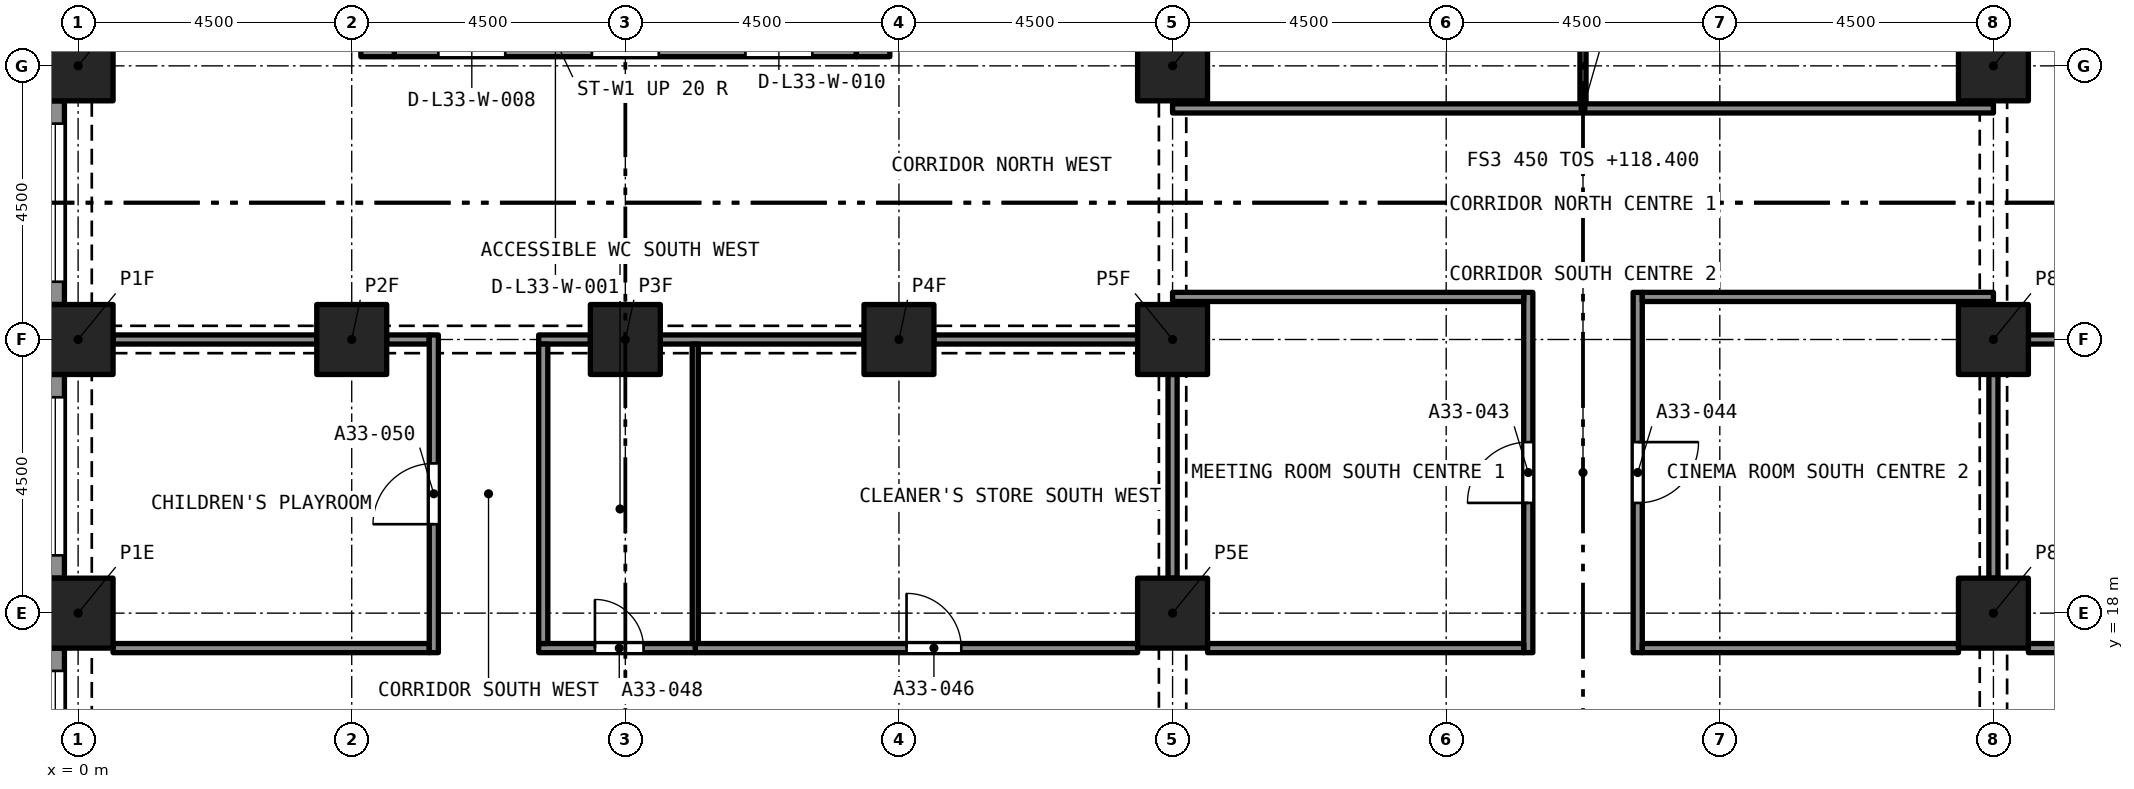
"""IFC4 building model, lengths in metres.
Left out: names, types, materials, properties, quantities, classifications, styles, units other than length and angle.
Written with IfcOpenShell. Run it as: python <this file> out.ifc"""

import sys

from ifc_helpers import new_model, si_unit, direction, frame, frame_2d, origin, origin_2d, place, context, subcontext, project, spatial, rectangle, extrude, element, fill, save


model = new_model("IFC4")
c1 = context("Model", 3, precision=1e-05, world=origin(), true_north=direction((0.0, 1.0)))
c2 = subcontext(c1, "Body", "Model", "MODEL_VIEW")
j1 = project(units=[si_unit("LENGTHUNIT", "METRE"), si_unit("PLANEANGLEUNIT", "RADIAN")], contexts=[c1])
p1 = place(None, origin())
s1 = spatial("IfcSite", under=j1, at=p1, CompositionType="ELEMENT")
p2 = place(p1, origin())
s2 = spatial("IfcBuilding", under=s1, at=p2, CompositionType="ELEMENT")
p3 = place(p2, frame((0.0, 0.0, 118.4)))
s3 = spatial("IfcBuildingStorey", under=s2, at=p3, CompositionType="ELEMENT", Elevation=118.4)
for number, where, z_axis, x_axis in (
    (1, (0.0, 18.0, 0.0), (0.0, 0.0, 1.0), (1.0, 0.0, 0.0)),
    (2, (18.0, 18.0, 0.0), (0.0, 0.0, 1.0), (1.0, 0.0, 0.0)),
    (3, (31.5, 18.0, 0.0), (0.0, 0.0, 1.0), (1.0, 0.0, 0.0)),
    (4, (0.0, 22.5, 0.0), (0.0, 0.0, 1.0), (1.0, 0.0, 0.0)),
    (5, (4.5, 22.5, 0.0), (0.0, 0.0, 1.0), (1.0, 0.0, 0.0)),
    (6, (9.0, 22.5, 0.0), (0.0, 0.0, 1.0), (1.0, 0.0, 0.0)),
    (7, (13.5, 22.5, 0.0), (0.0, 0.0, 1.0), (1.0, 0.0, 0.0)),
    (8, (18.0, 22.5, 0.0), (0.0, 0.0, 1.0), (1.0, 0.0, 0.0)),
    (9, (31.5, 22.5, 0.0), (0.0, 0.0, 1.0), (1.0, 0.0, 0.0)),
    (10, (0.0, 27.0, 0.0), (0.0, 0.0, 1.0), (1.0, 0.0, 0.0)),
    (11, (18.0, 27.0, 0.0), (0.0, 0.0, 1.0), (1.0, 0.0, 0.0)),
    (12, (31.5, 27.0, 0.0), (0.0, 0.0, 1.0), (1.0, 0.0, 0.0)),
):
    element("IfcColumn", number, at=place(p3, frame(where, z_axis=z_axis, x_axis=x_axis)), inside=s3, PredefinedType="COLUMN", context=c2, shape_type="SweptSolid", body=[
        extrude(rectangle(XDim=1.15, YDim=1.15, at=origin_2d()), origin(), (0.0, 0.0, 1.0), 3.2),
    ])
p4 = place(p3, frame((5.2, 27.425, 0.0), z_axis=(0.0, 0.0, 1.0), x_axis=(1.0, 0.0, 0.0)))
e13 = element("IfcWall", 13, at=p4, inside=s3, PredefinedType="SOLIDWALL", context=c2, shape_type="SweptSolid", body=[
    extrude(rectangle(XDim=7.6, YDim=0.55, at=frame_2d((3.8, 0.0))), origin(), (0.0, 0.0, 1.0), 3.2),
])
p5 = place(p4, frame((0.725, 0.0, 0.0)))
e14 = element("IfcOpeningElement", 14, at=p5, cuts=e13, PredefinedType="OPENING", context=c2, shape_type="SweptSolid", body=[
    extrude(rectangle(XDim=1.1, YDim=2.1, at=frame_2d((0.55, 1.05))), frame((0.0, 0.285, 0.0), z_axis=(0.0, -1.0, 0.0), x_axis=(1.0, 0.0, 0.0)), (0.0, 0.0, 1.0), 0.57),
])
p6 = place(p4, frame((3.25, 0.0, 0.0)))
e15 = element("IfcOpeningElement", 15, at=p6, cuts=e13, PredefinedType="OPENING", context=c2, shape_type="SweptSolid", body=[
    extrude(rectangle(XDim=1.1, YDim=2.1, at=frame_2d((0.55, 1.05))), frame((0.0, 0.285, 0.0), z_axis=(0.0, -1.0, 0.0), x_axis=(1.0, 0.0, 0.0)), (0.0, 0.0, 1.0), 0.57),
])
p7 = place(p4, frame((5.775, 0.0, 0.0)))
e16 = element("IfcOpeningElement", 16, at=p7, cuts=e13, PredefinedType="OPENING", context=c2, shape_type="SweptSolid", body=[
    extrude(rectangle(XDim=1.1, YDim=2.1, at=frame_2d((0.55, 1.05))), frame((0.0, 0.285, 0.0), z_axis=(0.0, -1.0, 0.0), x_axis=(1.0, 0.0, 0.0)), (0.0, 0.0, 1.0), 0.57),
])
p8 = place(p3, frame((4.925, 27.15, 0.0), z_axis=(0.0, 0.0, 1.0), x_axis=(0.0, 1.0, 0.0)))
e17 = element("IfcWall", 17, at=p8, inside=s3, PredefinedType="SOLIDWALL", context=c2, shape_type="SweptSolid", body=[
    extrude(rectangle(XDim=13.2, YDim=0.55, at=frame_2d((6.6, 0.0))), origin(), (0.0, 0.0, 1.0), 3.2),
])
p9 = place(p8, frame((8.8, 0.0, 0.0)))
e18 = element("IfcOpeningElement", 18, at=p9, cuts=e17, PredefinedType="OPENING", context=c2, shape_type="SweptSolid", body=[
    extrude(rectangle(XDim=1.2, YDim=2.1, at=frame_2d((0.6, 1.05))), frame((0.0, 0.285, 0.0), z_axis=(0.0, -1.0, 0.0), x_axis=(1.0, 0.0, 0.0)), (0.0, 0.0, 1.0), 0.57),
])
p10 = place(p3, frame((13.075, 27.15, 0.0), z_axis=(0.0, 0.0, 1.0), x_axis=(0.0, 1.0, 0.0)))
e19 = element("IfcWall", 19, at=p10, inside=s3, PredefinedType="SOLIDWALL", context=c2, shape_type="SweptSolid", body=[
    extrude(rectangle(XDim=13.2, YDim=0.55, at=frame_2d((6.6, 0.0))), origin(), (0.0, 0.0, 1.0), 3.2),
])
p11 = place(p10, frame((10.95, 0.0, 0.0)))
e20 = element("IfcOpeningElement", 20, at=p11, cuts=e19, PredefinedType="OPENING", context=c2, shape_type="SweptSolid", body=[
    extrude(rectangle(XDim=1.1, YDim=2.1, at=frame_2d((0.55, 1.05))), frame((0.0, 0.285, 0.0), z_axis=(0.0, -1.0, 0.0), x_axis=(1.0, 0.0, 0.0)), (0.0, 0.0, 1.0), 0.57),
])
p12 = place(p10, frame((8.8, 0.0, 0.0)))
e21 = element("IfcOpeningElement", 21, at=p12, cuts=e19, PredefinedType="OPENING", context=c2, shape_type="SweptSolid", body=[
    extrude(rectangle(XDim=1.2, YDim=2.1, at=frame_2d((0.6, 1.05))), frame((0.0, 0.285, 0.0), z_axis=(0.0, -1.0, 0.0), x_axis=(1.0, 0.0, 0.0)), (0.0, 0.0, 1.0), 0.57),
])
p13 = place(p3, frame((-0.375, 23.075, 0.0), z_axis=(0.0, 0.0, 1.0), x_axis=(0.0, 1.0, 0.0)))
e22 = element("IfcWall", 22, at=p13, inside=s3, PredefinedType="SOLIDWALL", context=c2, shape_type="SweptSolid", body=[
    extrude(rectangle(XDim=3.35, YDim=0.3, at=frame_2d((1.675, 0.0))), origin(), (0.0, 0.0, 1.0), 3.2),
])
p14 = place(p13, frame((0.375, 0.0, 0.45)))
e23 = element("IfcOpeningElement", 23, at=p14, cuts=e22, PredefinedType="OPENING", context=c2, shape_type="SweptSolid", body=[
    extrude(rectangle(XDim=2.6, YDim=1.95, at=frame_2d((1.3, 0.975))), frame((0.0, 0.16, 0.0), z_axis=(0.0, -1.0, 0.0), x_axis=(1.0, 0.0, 0.0)), (0.0, 0.0, 1.0), 0.32),
])
p15 = place(p3, frame((-0.375, 18.575, 0.0), z_axis=(0.0, 0.0, 1.0), x_axis=(0.0, 1.0, 0.0)))
e24 = element("IfcWall", 24, at=p15, inside=s3, PredefinedType="SOLIDWALL", context=c2, shape_type="SweptSolid", body=[
    extrude(rectangle(XDim=3.35, YDim=0.3, at=frame_2d((1.675, 0.0))), origin(), (0.0, 0.0, 1.0), 3.2),
])
p16 = place(p15, frame((0.375, 0.0, 0.45)))
e25 = element("IfcOpeningElement", 25, at=p16, cuts=e24, PredefinedType="OPENING", context=c2, shape_type="SweptSolid", body=[
    extrude(rectangle(XDim=2.6, YDim=1.95, at=frame_2d((1.3, 0.975))), frame((0.0, 0.16, 0.0), z_axis=(0.0, -1.0, 0.0), x_axis=(1.0, 0.0, 0.0)), (0.0, 0.0, 1.0), 0.32),
])
p17 = place(p3, frame((-0.375, 14.075, 0.0), z_axis=(0.0, 0.0, 1.0), x_axis=(0.0, 1.0, 0.0)))
e26 = element("IfcWall", 26, at=p17, inside=s3, PredefinedType="SOLIDWALL", context=c2, shape_type="SweptSolid", body=[
    extrude(rectangle(XDim=3.35, YDim=0.3, at=frame_2d((1.675, 0.0))), origin(), (0.0, 0.0, 1.0), 3.2),
])
p18 = place(p17, frame((0.375, 0.0, 0.45)))
e27 = element("IfcOpeningElement", 27, at=p18, cuts=e26, PredefinedType="OPENING", context=c2, shape_type="SweptSolid", body=[
    extrude(rectangle(XDim=2.6, YDim=1.95, at=frame_2d((1.3, 0.975))), frame((0.0, 0.16, 0.0), z_axis=(0.0, -1.0, 0.0), x_axis=(1.0, 0.0, 0.0)), (0.0, 0.0, 1.0), 0.32),
])
p19 = place(p3, frame((23.85, 17.35, 0.0), z_axis=(0.0, 0.0, 1.0), x_axis=(0.0, 1.0, 0.0)))
e28 = element("IfcWall", 28, at=p19, inside=s3, PredefinedType="PARTITIONING", context=c2, shape_type="SweptSolid", body=[
    extrude(rectangle(XDim=5.925, YDim=0.15, at=frame_2d((2.962, 0.0))), origin(), (0.0, 0.0, 1.0), 2.75),
])
p20 = place(p19, frame((2.462, 0.0, 0.0)))
e29 = element("IfcOpeningElement", 29, at=p20, cuts=e28, PredefinedType="OPENING", context=c2, shape_type="SweptSolid", body=[
    extrude(rectangle(XDim=1.0, YDim=2.1, at=frame_2d((0.5, 1.05))), frame((0.0, 0.085, 0.0), z_axis=(0.0, -1.0, 0.0), x_axis=(1.0, 0.0, 0.0)), (0.0, 0.0, 1.0), 0.17),
])
p21 = place(p3, frame((25.65, 23.275, 0.0), z_axis=(0.0, 0.0, 1.0), x_axis=(0.0, -1.0, 0.0)))
e30 = element("IfcWall", 30, at=p21, inside=s3, PredefinedType="PARTITIONING", context=c2, shape_type="SweptSolid", body=[
    extrude(rectangle(XDim=5.925, YDim=0.15, at=frame_2d((2.962, 0.0))), origin(), (0.0, 0.0, 1.0), 2.75),
])
p22 = place(p21, frame((2.462, 0.0, 0.0)))
e31 = element("IfcOpeningElement", 31, at=p22, cuts=e30, PredefinedType="OPENING", context=c2, shape_type="SweptSolid", body=[
    extrude(rectangle(XDim=1.0, YDim=2.1, at=frame_2d((0.5, 1.05))), frame((0.0, 0.085, 0.0), z_axis=(0.0, -1.0, 0.0), x_axis=(1.0, 0.0, 0.0)), (0.0, 0.0, 1.0), 0.17),
])
for number, where, z_axis, x_axis in (
    (32, (18.575, 17.425, 0.0), (0.0, 0.0, 1.0), (1.0, 0.0, 0.0)),
    (33, (25.725, 17.425, 0.0), (0.0, 0.0, 1.0), (1.0, 0.0, 0.0)),
):
    element("IfcWall", number, at=place(p3, frame(where, z_axis=z_axis, x_axis=x_axis)), inside=s3, PredefinedType="PARTITIONING", context=c2, shape_type="SweptSolid", body=[
        extrude(rectangle(XDim=5.2, YDim=0.15, at=frame_2d((2.6, 0.0))), origin(), (0.0, 0.0, 1.0), 2.75),
    ])
p23 = place(p3, frame((32.075, 17.425, 0.0), z_axis=(0.0, 0.0, 1.0), x_axis=(1.0, 0.0, 0.0)))
e34 = element("IfcWall", 34, at=p23, inside=s3, PredefinedType="PARTITIONING", context=c2, shape_type="SweptSolid", body=[
    extrude(rectangle(XDim=7.275, YDim=0.15, at=frame_2d((3.638, 0.0))), origin(), (0.0, 0.0, 1.0), 2.9),
])
p24 = place(p23, frame((2.9, 0.0, 0.0)))
e35 = element("IfcOpeningElement", 35, at=p24, cuts=e34, PredefinedType="OPENING", context=c2, shape_type="SweptSolid", body=[
    extrude(rectangle(XDim=0.9, YDim=2.1, at=frame_2d((0.45, 1.05))), frame((0.0, 0.085, 0.0), z_axis=(0.0, -1.0, 0.0), x_axis=(1.0, 0.0, 0.0)), (0.0, 0.0, 1.0), 0.17),
])
p25 = place(p3, frame((10.15, 17.425, 0.0), z_axis=(0.0, 0.0, 1.0), x_axis=(1.0, 0.0, 0.0)))
e36 = element("IfcWall", 36, at=p25, inside=s3, PredefinedType="PARTITIONING", context=c2, shape_type="SweptSolid", body=[
    extrude(rectangle(XDim=7.275, YDim=0.15, at=frame_2d((3.638, 0.0))), origin(), (0.0, 0.0, 1.0), 2.9),
])
p26 = place(p25, frame((3.475, 0.0, 0.0)))
e37 = element("IfcOpeningElement", 37, at=p26, cuts=e36, PredefinedType="OPENING", context=c2, shape_type="SweptSolid", body=[
    extrude(rectangle(XDim=0.9, YDim=2.1, at=frame_2d((0.45, 1.05))), frame((0.0, 0.085, 0.0), z_axis=(0.0, -1.0, 0.0), x_axis=(1.0, 0.0, 0.0)), (0.0, 0.0, 1.0), 0.17),
])
p27 = place(p3, frame((7.575, 17.425, 0.0), z_axis=(0.0, 0.0, 1.0), x_axis=(1.0, 0.0, 0.0)))
e38 = element("IfcWall", 38, at=p27, inside=s3, PredefinedType="PARTITIONING", context=c2, shape_type="SweptSolid", body=[
    extrude(rectangle(XDim=2.575, YDim=0.15, at=frame_2d((1.288, 0.0))), origin(), (0.0, 0.0, 1.0), 2.9),
])
p28 = place(p27, frame((0.925, 0.0, 0.0)))
e39 = element("IfcOpeningElement", 39, at=p28, cuts=e38, PredefinedType="OPENING", context=c2, shape_type="SweptSolid", body=[
    extrude(rectangle(XDim=0.8, YDim=2.1, at=frame_2d((0.4, 1.05))), frame((0.0, 0.085, 0.0), z_axis=(0.0, -1.0, 0.0), x_axis=(1.0, 0.0, 0.0)), (0.0, 0.0, 1.0), 0.17),
])
p29 = place(p3, frame((0.575, 17.425, 0.0), z_axis=(0.0, 0.0, 1.0), x_axis=(1.0, 0.0, 0.0)))
e40 = element("IfcWall", 40, at=p29, inside=s3, PredefinedType="PARTITIONING", context=c2, shape_type="SweptSolid", body=[
    extrude(rectangle(XDim=5.2, YDim=0.15, at=frame_2d((2.6, 0.0))), origin(), (0.0, 0.0, 1.0), 2.9),
])
p30 = place(p3, frame((24.75, 26.375, 0.0), z_axis=(0.0, 0.0, 1.0), x_axis=(0.0, 1.0, 0.0)))
e41 = element("IfcWall", 41, at=p30, inside=s3, PredefinedType="PARTITIONING", context=c2, shape_type="SweptSolid", body=[
    extrude(rectangle(XDim=10.125, YDim=0.1, at=frame_2d((5.062, 0.0))), origin(), (0.0, 0.0, 1.0), 2.75),
])
p31 = place(p3, frame((18.0, 26.3, 0.0), z_axis=(0.0, 0.0, 1.0), x_axis=(1.0, 0.0, 0.0)))
e42 = element("IfcWall", 42, at=p31, inside=s3, PredefinedType="PARTITIONING", context=c2, shape_type="SweptSolid", body=[
    extrude(rectangle(XDim=13.5, YDim=0.15, at=frame_2d((6.75, 0.0))), origin(), (0.0, 0.0, 1.0), 2.38),
])
p32 = place(p3, frame((18.0, 23.2, 0.0), z_axis=(0.0, 0.0, 1.0), x_axis=(1.0, 0.0, 0.0)))
e43 = element("IfcWall", 43, at=p32, inside=s3, PredefinedType="PARTITIONING", context=c2, shape_type="SweptSolid", body=[
    extrude(rectangle(XDim=5.775, YDim=0.15, at=frame_2d((2.887, 0.0))), origin(), (0.0, 0.0, 1.0), 2.75),
])
p33 = place(p3, frame((18.0, 18.575, 0.0), z_axis=(0.0, 0.0, 1.0), x_axis=(0.0, 1.0, 0.0)))
e44 = element("IfcWall", 44, at=p33, inside=s3, PredefinedType="PARTITIONING", context=c2, shape_type="SweptSolid", body=[
    extrude(rectangle(XDim=3.35, YDim=0.15, at=frame_2d((1.675, 0.0))), origin(), (0.0, 0.0, 1.0), 2.38),
])
p34 = place(p3, frame((25.725, 23.2, 0.0), z_axis=(0.0, 0.0, 1.0), x_axis=(1.0, 0.0, 0.0)))
e45 = element("IfcWall", 45, at=p34, inside=s3, PredefinedType="PARTITIONING", context=c2, shape_type="SweptSolid", body=[
    extrude(rectangle(XDim=5.775, YDim=0.15, at=frame_2d((2.887, 0.0))), origin(), (0.0, 0.0, 1.0), 2.75),
])
p35 = place(p3, frame((31.5, 18.575, 0.0), z_axis=(0.0, 0.0, 1.0), x_axis=(0.0, 1.0, 0.0)))
e46 = element("IfcWall", 46, at=p35, inside=s3, PredefinedType="PARTITIONING", context=c2, shape_type="SweptSolid", body=[
    extrude(rectangle(XDim=3.35, YDim=0.15, at=frame_2d((1.675, 0.0))), origin(), (0.0, 0.0, 1.0), 2.38),
])
p36 = place(p3, frame((32.075, 22.5, 0.0), z_axis=(0.0, 0.0, 1.0), x_axis=(1.0, 0.0, 0.0)))
e47 = element("IfcWall", 47, at=p36, inside=s3, PredefinedType="PARTITIONING", context=c2, shape_type="SweptSolid", body=[
    extrude(rectangle(XDim=9.85, YDim=0.15, at=frame_2d((4.925, 0.0))), origin(), (0.0, 0.0, 1.0), 2.9),
])
for number, where, z_axis, x_axis in (
    (48, (14.075, 22.5, 0.0), (0.0, 0.0, 1.0), (1.0, 0.0, 0.0)),
    (49, (9.575, 22.5, 0.0), (0.0, 0.0, 1.0), (1.0, 0.0, 0.0)),
):
    element("IfcWall", number, at=place(p3, frame(where, z_axis=z_axis, x_axis=x_axis)), inside=s3, PredefinedType="PARTITIONING", context=c2, shape_type="SweptSolid", body=[
        extrude(rectangle(XDim=3.35, YDim=0.15, at=frame_2d((1.675, 0.0))), origin(), (0.0, 0.0, 1.0), 2.38),
    ])
p37 = place(p3, frame((7.575, 22.5, 0.0), z_axis=(0.0, 0.0, 1.0), x_axis=(1.0, 0.0, 0.0)))
e50 = element("IfcWall", 50, at=p37, inside=s3, PredefinedType="PARTITIONING", context=c2, shape_type="SweptSolid", body=[
    extrude(rectangle(XDim=0.85, YDim=0.15, at=frame_2d((0.425, 0.0))), origin(), (0.0, 0.0, 1.0), 2.38),
])
p38 = place(p3, frame((5.075, 22.5, 0.0), z_axis=(0.0, 0.0, 1.0), x_axis=(1.0, 0.0, 0.0)))
e51 = element("IfcWall", 51, at=p38, inside=s3, PredefinedType="PARTITIONING", context=c2, shape_type="SweptSolid", body=[
    extrude(rectangle(XDim=0.7, YDim=0.15, at=frame_2d((0.35, 0.0))), origin(), (0.0, 0.0, 1.0), 2.38),
])
p39 = place(p3, frame((0.575, 22.5, 0.0), z_axis=(0.0, 0.0, 1.0), x_axis=(1.0, 0.0, 0.0)))
e52 = element("IfcWall", 52, at=p39, inside=s3, PredefinedType="PARTITIONING", context=c2, shape_type="SweptSolid", body=[
    extrude(rectangle(XDim=3.35, YDim=0.15, at=frame_2d((1.675, 0.0))), origin(), (0.0, 0.0, 1.0), 2.38),
])
p40 = place(p3, frame((7.65, 17.5, 0.0), z_axis=(0.0, 0.0, 1.0), x_axis=(0.0, 1.0, 0.0)))
e53 = element("IfcWall", 53, at=p40, inside=s3, PredefinedType="PARTITIONING", context=c2, shape_type="SweptSolid", body=[
    extrude(rectangle(XDim=4.925, YDim=0.15, at=frame_2d((2.462, 0.0))), origin(), (0.0, 0.0, 1.0), 2.9),
])
p41 = place(p3, frame((5.85, 17.35, 0.0), z_axis=(0.0, 0.0, 1.0), x_axis=(0.0, 1.0, 0.0)))
e54 = element("IfcWall", 54, at=p41, inside=s3, PredefinedType="PARTITIONING", context=c2, shape_type="SweptSolid", body=[
    extrude(rectangle(XDim=5.225, YDim=0.15, at=frame_2d((2.612, 0.0))), origin(), (0.0, 0.0, 1.0), 2.9),
])
p42 = place(p41, frame((2.113, 0.0, 0.0)))
e55 = element("IfcOpeningElement", 55, at=p42, cuts=e54, PredefinedType="OPENING", context=c2, shape_type="SweptSolid", body=[
    extrude(rectangle(XDim=1.0, YDim=2.1, at=frame_2d((0.5, 1.05))), frame((0.0, 0.085, 0.0), z_axis=(0.0, -1.0, 0.0), x_axis=(1.0, 0.0, 0.0)), (0.0, 0.0, 1.0), 0.17),
])
p43 = place(p3, frame((10.15, 17.5, 0.0), z_axis=(0.0, 0.0, 1.0), x_axis=(0.0, 1.0, 0.0)))
e56 = element("IfcWall", 56, at=p43, inside=s3, PredefinedType="PARTITIONING", context=c2, shape_type="SweptSolid", body=[
    extrude(rectangle(XDim=4.925, YDim=0.1, at=frame_2d((2.462, 0.0))), origin(), (0.0, 0.0, 1.0), 2.9),
])
p44 = place(p14, origin())
e57 = element("IfcWindow", 57, at=p44, inside=s3, PartitioningType="SINGLE_PANEL", PredefinedType="WINDOW", context=c2, shape_type="SweptSolid", body=[
    extrude(rectangle(XDim=2.6, YDim=1.95, at=frame_2d((1.3, 0.975))), frame((0.0, 0.03, 0.0), z_axis=(0.0, -1.0, 0.0), x_axis=(1.0, 0.0, 0.0)), (0.0, 0.0, 1.0), 0.06),
])
fill(e23, e57)
p45 = place(p16, origin())
e58 = element("IfcWindow", 58, at=p45, inside=s3, PartitioningType="SINGLE_PANEL", PredefinedType="WINDOW", context=c2, shape_type="SweptSolid", body=[
    extrude(rectangle(XDim=2.6, YDim=1.95, at=frame_2d((1.3, 0.975))), frame((0.0, 0.03, 0.0), z_axis=(0.0, -1.0, 0.0), x_axis=(1.0, 0.0, 0.0)), (0.0, 0.0, 1.0), 0.06),
])
fill(e25, e58)
p46 = place(p18, origin())
e59 = element("IfcWindow", 59, at=p46, inside=s3, PartitioningType="SINGLE_PANEL", PredefinedType="WINDOW", context=c2, shape_type="SweptSolid", body=[
    extrude(rectangle(XDim=2.6, YDim=1.95, at=frame_2d((1.3, 0.975))), frame((0.0, 0.03, 0.0), z_axis=(0.0, -1.0, 0.0), x_axis=(1.0, 0.0, 0.0)), (0.0, 0.0, 1.0), 0.06),
])
fill(e27, e59)
p47 = place(p20, origin())
e60 = element("IfcDoor", 60, at=p47, inside=s3, OperationType="SINGLE_SWING_RIGHT", PredefinedType="DOOR", context=c2, shape_type="SweptSolid", body=[
    extrude(rectangle(XDim=1.0, YDim=2.1, at=frame_2d((0.5, 1.05))), frame((0.0, 0.025, 0.0), z_axis=(0.0, -1.0, 0.0), x_axis=(1.0, 0.0, 0.0)), (0.0, 0.0, 1.0), 0.05),
])
fill(e29, e60)
p48 = place(p22, origin())
e61 = element("IfcDoor", 61, at=p48, inside=s3, OperationType="SINGLE_SWING_RIGHT", PredefinedType="DOOR", context=c2, shape_type="SweptSolid", body=[
    extrude(rectangle(XDim=1.0, YDim=2.1, at=frame_2d((0.5, 1.05))), frame((0.0, 0.025, 0.0), z_axis=(0.0, -1.0, 0.0), x_axis=(1.0, 0.0, 0.0)), (0.0, 0.0, 1.0), 0.05),
])
fill(e31, e61)
p49 = place(p26, origin())
e62 = element("IfcDoor", 62, at=p49, inside=s3, OperationType="SINGLE_SWING_RIGHT", PredefinedType="DOOR", context=c2, shape_type="SweptSolid", body=[
    extrude(rectangle(XDim=0.9, YDim=2.1, at=frame_2d((0.45, 1.05))), frame((0.0, 0.025, 0.0), z_axis=(0.0, -1.0, 0.0), x_axis=(1.0, 0.0, 0.0)), (0.0, 0.0, 1.0), 0.05),
])
fill(e37, e62)
p50 = place(p28, origin())
e63 = element("IfcDoor", 63, at=p50, inside=s3, OperationType="SINGLE_SWING_RIGHT", PredefinedType="DOOR", context=c2, shape_type="SweptSolid", body=[
    extrude(rectangle(XDim=0.8, YDim=2.1, at=frame_2d((0.4, 1.05))), frame((0.0, 0.025, 0.0), z_axis=(0.0, -1.0, 0.0), x_axis=(1.0, 0.0, 0.0)), (0.0, 0.0, 1.0), 0.05),
])
fill(e39, e63)
p51 = place(p42, origin())
e64 = element("IfcDoor", 64, at=p51, inside=s3, OperationType="SINGLE_SWING_LEFT", PredefinedType="DOOR", context=c2, shape_type="SweptSolid", body=[
    extrude(rectangle(XDim=1.0, YDim=2.1, at=frame_2d((0.5, 1.05))), frame((0.0, 0.025, 0.0), z_axis=(0.0, -1.0, 0.0), x_axis=(1.0, 0.0, 0.0)), (0.0, 0.0, 1.0), 0.05),
])
fill(e55, e64)
save(model, sys.argv[1])
